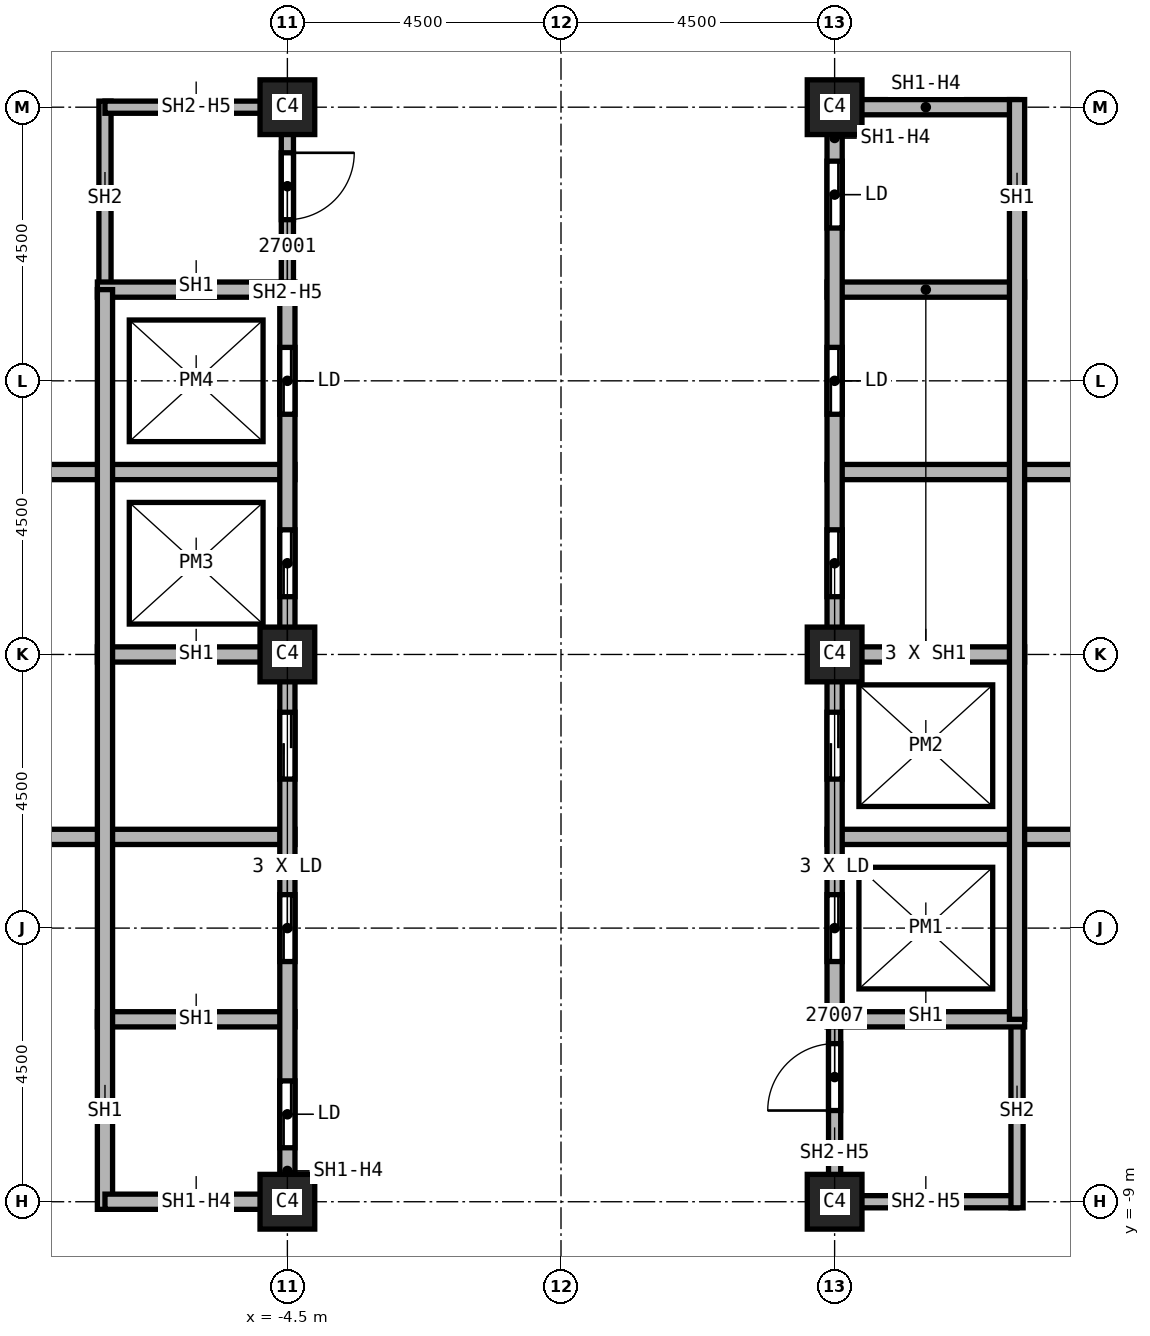
"""IFC4 building model, lengths in metres.
Left out: names, types, materials, properties, quantities, classifications, styles, units other than length and angle.
Written with IfcOpenShell. Run it as: python <this file> out.ifc"""

import sys

from ifc_helpers import new_model, si_unit, direction, frame, frame_2d, origin, origin_2d, place, context, subcontext, project, spatial, rectangle, extrude, element, fill, save


model = new_model("IFC4")
c1 = context("Model", 3, precision=1e-05, world=origin(), true_north=direction((0.0, 1.0)))
c2 = subcontext(c1, "Body", "Model", "MODEL_VIEW")
j1 = project(units=[si_unit("LENGTHUNIT", "METRE"), si_unit("PLANEANGLEUNIT", "RADIAN")], contexts=[c1])
p1 = place(None, origin())
s1 = spatial("IfcSite", under=j1, at=p1, CompositionType="ELEMENT")
p2 = place(p1, origin())
s2 = spatial("IfcBuilding", under=s1, at=p2, CompositionType="ELEMENT")
p3 = place(p2, frame((0.0, 0.0, 178.0)))
s3 = spatial("IfcBuildingStorey", under=s2, at=p3, CompositionType="ELEMENT", Elevation=178.0)
for number, where, z_axis, x_axis in (
    (1, (4.5, 0.0, 0.0), (0.0, 0.0, 1.0), (1.0, 0.0, 0.0)),
    (2, (4.5, 9.0, 0.0), (0.0, 0.0, 1.0), (1.0, 0.0, 0.0)),
    (3, (4.5, -9.0, 0.0), (0.0, 0.0, 1.0), (1.0, 0.0, 0.0)),
    (4, (-4.5, 0.0, 0.0), (0.0, 0.0, 1.0), (1.0, 0.0, 0.0)),
    (5, (-4.5, 9.0, 0.0), (0.0, 0.0, 1.0), (1.0, 0.0, 0.0)),
    (6, (-4.5, -9.0, 0.0), (0.0, 0.0, 1.0), (1.0, 0.0, 0.0)),
):
    element("IfcColumn", number, at=place(p3, frame(where, z_axis=z_axis, x_axis=x_axis)), inside=s3, PredefinedType="COLUMN", context=c2, shape_type="SweptSolid", body=[
        extrude(rectangle(XDim=0.9, YDim=0.9, at=origin_2d()), origin(), (0.0, 0.0, 1.0), 5.72),
    ])
p4 = place(p3, frame((-7.5, 6.0, 0.0), z_axis=(0.0, 0.0, 1.0), x_axis=(0.0, 1.0, 0.0)))
e7 = element("IfcWall", 7, at=p4, inside=s3, PredefinedType="SOLIDWALL", context=c2, shape_type="SweptSolid", body=[
    extrude(rectangle(XDim=3.1, YDim=0.2, at=frame_2d((1.55, 0.0))), origin(), (0.0, 0.0, 1.0), 5.72),
])
p5 = place(p3, frame((-7.5, 9.0, 0.0), z_axis=(0.0, 0.0, 1.0), x_axis=(1.0, 0.0, 0.0)))
e8 = element("IfcWall", 8, at=p5, inside=s3, PredefinedType="SOLIDWALL", context=c2, shape_type="SweptSolid", body=[
    extrude(rectangle(XDim=3.0, YDim=0.2, at=frame_2d((1.5, 0.0))), origin(), (0.0, 0.0, 1.0), 4.958),
])
p6 = place(p3, frame((-4.5, 9.1, 0.0), z_axis=(0.0, 0.0, 1.0), x_axis=(0.0, -1.0, 0.0)))
e9 = element("IfcWall", 9, at=p6, inside=s3, PredefinedType="SOLIDWALL", context=c2, shape_type="SweptSolid", body=[
    extrude(rectangle(XDim=3.1, YDim=0.2, at=frame_2d((1.55, 0.0))), origin(), (0.0, 0.0, 1.0), 4.958),
])
p7 = place(p6, frame((0.85, 0.0, 0.0)))
e10 = element("IfcOpeningElement", 10, at=p7, cuts=e9, PredefinedType="OPENING", context=c2, shape_type="SweptSolid", body=[
    extrude(rectangle(XDim=1.1, YDim=2.1, at=frame_2d((0.55, 1.05))), frame((0.0, 0.1, 0.0), z_axis=(0.0, -1.0, 0.0), x_axis=(1.0, 0.0, 0.0)), (0.0, 0.0, 1.0), 0.2),
])
p8 = place(p3, frame((4.5, -9.1, 0.0), z_axis=(0.0, 0.0, 1.0), x_axis=(0.0, 1.0, 0.0)))
e11 = element("IfcWall", 11, at=p8, inside=s3, PredefinedType="SOLIDWALL", context=c2, shape_type="SweptSolid", body=[
    extrude(rectangle(XDim=3.1, YDim=0.2, at=frame_2d((1.55, 0.0))), origin(), (0.0, 0.0, 1.0), 4.958),
])
p9 = place(p8, frame((1.6, 0.0, 0.0)))
e12 = element("IfcOpeningElement", 12, at=p9, cuts=e11, PredefinedType="OPENING", context=c2, shape_type="SweptSolid", body=[
    extrude(rectangle(XDim=1.1, YDim=2.1, at=frame_2d((0.55, 1.05))), frame((0.0, 0.1, 0.0), z_axis=(0.0, -1.0, 0.0), x_axis=(1.0, 0.0, 0.0)), (0.0, 0.0, 1.0), 0.2),
])
p10 = place(p3, frame((7.5, -9.0, 0.0), z_axis=(0.0, 0.0, 1.0), x_axis=(-1.0, 0.0, 0.0)))
e13 = element("IfcWall", 13, at=p10, inside=s3, PredefinedType="SOLIDWALL", context=c2, shape_type="SweptSolid", body=[
    extrude(rectangle(XDim=3.0, YDim=0.2, at=frame_2d((1.5, 0.0))), origin(), (0.0, 0.0, 1.0), 4.958),
])
p11 = place(p3, frame((7.5, -6.0, 0.0), z_axis=(0.0, 0.0, 1.0), x_axis=(0.0, -1.0, 0.0)))
e14 = element("IfcWall", 14, at=p11, inside=s3, PredefinedType="SOLIDWALL", context=c2, shape_type="SweptSolid", body=[
    extrude(rectangle(XDim=3.1, YDim=0.2, at=frame_2d((1.55, 0.0))), origin(), (0.0, 0.0, 1.0), 5.72),
])
p12 = place(p3, frame((-13.625, 3.0, 0.0), z_axis=(0.0, 0.0, 1.0), x_axis=(1.0, 0.0, 0.0)))
e15 = element("IfcWall", 15, at=p12, inside=s3, PredefinedType="SOLIDWALL", context=c2, shape_type="SweptSolid", body=[
    extrude(rectangle(XDim=9.25, YDim=0.25, at=frame_2d((4.625, 0.0))), origin(), (0.0, 0.0, 1.0), 5.72),
])
p13 = place(p12, frame((3.25, 0.0, 0.0)))
e16 = element("IfcOpeningElement", 16, at=p13, cuts=e15, PredefinedType="OPENING", context=c2, shape_type="SweptSolid", body=[
    extrude(rectangle(XDim=1.1, YDim=2.1, at=frame_2d((0.55, 1.05))), frame((0.0, 0.125, 0.0), z_axis=(0.0, -1.0, 0.0), x_axis=(1.0, 0.0, 0.0)), (0.0, 0.0, 1.0), 0.25),
])
p14 = place(p3, frame((-13.625, -3.0, 0.0), z_axis=(0.0, 0.0, 1.0), x_axis=(1.0, 0.0, 0.0)))
e17 = element("IfcWall", 17, at=p14, inside=s3, PredefinedType="SOLIDWALL", context=c2, shape_type="SweptSolid", body=[
    extrude(rectangle(XDim=9.25, YDim=0.25, at=frame_2d((4.625, 0.0))), origin(), (0.0, 0.0, 1.0), 5.72),
])
p15 = place(p14, frame((3.25, 0.0, 0.0)))
e18 = element("IfcOpeningElement", 18, at=p15, cuts=e17, PredefinedType="OPENING", context=c2, shape_type="SweptSolid", body=[
    extrude(rectangle(XDim=1.1, YDim=2.1, at=frame_2d((0.55, 1.05))), frame((0.0, 0.125, 0.0), z_axis=(0.0, -1.0, 0.0), x_axis=(1.0, 0.0, 0.0)), (0.0, 0.0, 1.0), 0.25),
])
for number, where, z_axis, x_axis in (
    (19, (-7.625, -6.0, 0.0), (0.0, 0.0, 1.0), (1.0, 0.0, 0.0)),
    (20, (-7.625, 0.0, 0.0), (0.0, 0.0, 1.0), (1.0, 0.0, 0.0)),
    (21, (-7.625, 6.0, 0.0), (0.0, 0.0, 1.0), (1.0, 0.0, 0.0)),
):
    element("IfcWall", number, at=place(p3, frame(where, z_axis=z_axis, x_axis=x_axis)), inside=s3, PredefinedType="SOLIDWALL", context=c2, shape_type="SweptSolid", body=[
        extrude(rectangle(XDim=3.25, YDim=0.25, at=frame_2d((1.625, 0.0))), origin(), (0.0, 0.0, 1.0), 5.72),
    ])
p16 = place(p3, frame((-7.5, -9.125, 0.0), z_axis=(0.0, 0.0, 1.0), x_axis=(0.0, 1.0, 0.0)))
e22 = element("IfcWall", 22, at=p16, inside=s3, PredefinedType="SOLIDWALL", context=c2, shape_type="SweptSolid", body=[
    extrude(rectangle(XDim=15.125, YDim=0.25, at=frame_2d((7.562, 0.0))), origin(), (0.0, 0.0, 1.0), 5.72),
])
p17 = place(p3, frame((-4.5, -9.0, 0.0), z_axis=(0.0, 0.0, 1.0), x_axis=(-1.0, 0.0, 0.0)))
e23 = element("IfcWall", 23, at=p17, inside=s3, PredefinedType="SOLIDWALL", context=c2, shape_type="SweptSolid", body=[
    extrude(rectangle(XDim=3.0, YDim=0.25, at=frame_2d((1.5, 0.0))), origin(), (0.0, 0.0, 1.0), 4.958),
])
p18 = place(p3, frame((-4.5, 6.0, 0.0), z_axis=(0.0, 0.0, 1.0), x_axis=(0.0, -1.0, 0.0)))
e24 = element("IfcWall", 24, at=p18, inside=s3, PredefinedType="SOLIDWALL", context=c2, shape_type="SweptSolid", body=[
    extrude(rectangle(XDim=15.125, YDim=0.25, at=frame_2d((7.562, 0.0))), origin(), (0.0, 0.0, 1.0), 4.958),
])
p19 = place(p18, frame((13.012, 0.0, 0.0)))
e25 = element("IfcOpeningElement", 25, at=p19, cuts=e24, PredefinedType="OPENING", context=c2, shape_type="SweptSolid", body=[
    extrude(rectangle(XDim=1.1, YDim=2.1, at=frame_2d((0.55, 1.05))), frame((0.0, 0.125, 0.0), z_axis=(0.0, -1.0, 0.0), x_axis=(1.0, 0.0, 0.0)), (0.0, 0.0, 1.0), 0.25),
])
p20 = place(p18, frame((9.95, 0.0, 0.0)))
e26 = element("IfcOpeningElement", 26, at=p20, cuts=e24, PredefinedType="OPENING", context=c2, shape_type="SweptSolid", body=[
    extrude(rectangle(XDim=1.1, YDim=2.1, at=frame_2d((0.55, 1.05))), frame((0.0, 0.125, 0.0), z_axis=(0.0, -1.0, 0.0), x_axis=(1.0, 0.0, 0.0)), (0.0, 0.0, 1.0), 0.25),
])
p21 = place(p18, frame((6.95, 0.0, 0.0)))
e27 = element("IfcOpeningElement", 27, at=p21, cuts=e24, PredefinedType="OPENING", context=c2, shape_type="SweptSolid", body=[
    extrude(rectangle(XDim=1.1, YDim=2.1, at=frame_2d((0.55, 1.05))), frame((0.0, 0.125, 0.0), z_axis=(0.0, -1.0, 0.0), x_axis=(1.0, 0.0, 0.0)), (0.0, 0.0, 1.0), 0.25),
])
p22 = place(p18, frame((3.95, 0.0, 0.0)))
e28 = element("IfcOpeningElement", 28, at=p22, cuts=e24, PredefinedType="OPENING", context=c2, shape_type="SweptSolid", body=[
    extrude(rectangle(XDim=1.1, YDim=2.1, at=frame_2d((0.55, 1.05))), frame((0.0, 0.125, 0.0), z_axis=(0.0, -1.0, 0.0), x_axis=(1.0, 0.0, 0.0)), (0.0, 0.0, 1.0), 0.25),
])
p23 = place(p18, frame((0.95, 0.0, 0.0)))
e29 = element("IfcOpeningElement", 29, at=p23, cuts=e24, PredefinedType="OPENING", context=c2, shape_type="SweptSolid", body=[
    extrude(rectangle(XDim=1.1, YDim=2.1, at=frame_2d((0.55, 1.05))), frame((0.0, 0.125, 0.0), z_axis=(0.0, -1.0, 0.0), x_axis=(1.0, 0.0, 0.0)), (0.0, 0.0, 1.0), 0.25),
])
p24 = place(p3, frame((4.375, -6.0, 0.0), z_axis=(0.0, 0.0, 1.0), x_axis=(1.0, 0.0, 0.0)))
e30 = element("IfcWall", 30, at=p24, inside=s3, PredefinedType="SOLIDWALL", context=c2, shape_type="SweptSolid", body=[
    extrude(rectangle(XDim=3.25, YDim=0.25, at=frame_2d((1.625, 0.0))), origin(), (0.0, 0.0, 1.0), 5.72),
])
p25 = place(p3, frame((4.375, -3.0, 0.0), z_axis=(0.0, 0.0, 1.0), x_axis=(1.0, 0.0, 0.0)))
e31 = element("IfcWall", 31, at=p25, inside=s3, PredefinedType="SOLIDWALL", context=c2, shape_type="SweptSolid", body=[
    extrude(rectangle(XDim=9.25, YDim=0.25, at=frame_2d((4.625, 0.0))), origin(), (0.0, 0.0, 1.0), 5.72),
])
p26 = place(p25, frame((4.875, 0.0, 0.0)))
e32 = element("IfcOpeningElement", 32, at=p26, cuts=e31, PredefinedType="OPENING", context=c2, shape_type="SweptSolid", body=[
    extrude(rectangle(XDim=1.1, YDim=2.1, at=frame_2d((0.55, 1.05))), frame((0.0, 0.125, 0.0), z_axis=(0.0, -1.0, 0.0), x_axis=(1.0, 0.0, 0.0)), (0.0, 0.0, 1.0), 0.25),
])
p27 = place(p3, frame((4.375, 0.0, 0.0), z_axis=(0.0, 0.0, 1.0), x_axis=(1.0, 0.0, 0.0)))
e33 = element("IfcWall", 33, at=p27, inside=s3, PredefinedType="SOLIDWALL", context=c2, shape_type="SweptSolid", body=[
    extrude(rectangle(XDim=3.25, YDim=0.25, at=frame_2d((1.625, 0.0))), origin(), (0.0, 0.0, 1.0), 5.72),
])
p28 = place(p3, frame((4.375, 3.0, 0.0), z_axis=(0.0, 0.0, 1.0), x_axis=(1.0, 0.0, 0.0)))
e34 = element("IfcWall", 34, at=p28, inside=s3, PredefinedType="SOLIDWALL", context=c2, shape_type="SweptSolid", body=[
    extrude(rectangle(XDim=9.25, YDim=0.25, at=frame_2d((4.625, 0.0))), origin(), (0.0, 0.0, 1.0), 5.72),
])
p29 = place(p28, frame((4.875, 0.0, 0.0)))
e35 = element("IfcOpeningElement", 35, at=p29, cuts=e34, PredefinedType="OPENING", context=c2, shape_type="SweptSolid", body=[
    extrude(rectangle(XDim=1.1, YDim=2.1, at=frame_2d((0.55, 1.05))), frame((0.0, 0.125, 0.0), z_axis=(0.0, -1.0, 0.0), x_axis=(1.0, 0.0, 0.0)), (0.0, 0.0, 1.0), 0.25),
])
p30 = place(p3, frame((4.375, 6.0, 0.0), z_axis=(0.0, 0.0, 1.0), x_axis=(1.0, 0.0, 0.0)))
e36 = element("IfcWall", 36, at=p30, inside=s3, PredefinedType="SOLIDWALL", context=c2, shape_type="SweptSolid", body=[
    extrude(rectangle(XDim=3.25, YDim=0.25, at=frame_2d((1.625, 0.0))), origin(), (0.0, 0.0, 1.0), 5.72),
])
p31 = place(p3, frame((4.5, -6.0, 0.0), z_axis=(0.0, 0.0, 1.0), x_axis=(0.0, 1.0, 0.0)))
e37 = element("IfcWall", 37, at=p31, inside=s3, PredefinedType="SOLIDWALL", context=c2, shape_type="SweptSolid", body=[
    extrude(rectangle(XDim=15.125, YDim=0.25, at=frame_2d((7.562, 0.0))), origin(), (0.0, 0.0, 1.0), 4.958),
])
p32 = place(p31, frame((0.95, 0.0, 0.0)))
e38 = element("IfcOpeningElement", 38, at=p32, cuts=e37, PredefinedType="OPENING", context=c2, shape_type="SweptSolid", body=[
    extrude(rectangle(XDim=1.1, YDim=2.1, at=frame_2d((0.55, 1.05))), frame((0.0, 0.125, 0.0), z_axis=(0.0, -1.0, 0.0), x_axis=(1.0, 0.0, 0.0)), (0.0, 0.0, 1.0), 0.25),
])
p33 = place(p31, frame((3.95, 0.0, 0.0)))
e39 = element("IfcOpeningElement", 39, at=p33, cuts=e37, PredefinedType="OPENING", context=c2, shape_type="SweptSolid", body=[
    extrude(rectangle(XDim=1.1, YDim=2.1, at=frame_2d((0.55, 1.05))), frame((0.0, 0.125, 0.0), z_axis=(0.0, -1.0, 0.0), x_axis=(1.0, 0.0, 0.0)), (0.0, 0.0, 1.0), 0.25),
])
p34 = place(p31, frame((6.95, 0.0, 0.0)))
e40 = element("IfcOpeningElement", 40, at=p34, cuts=e37, PredefinedType="OPENING", context=c2, shape_type="SweptSolid", body=[
    extrude(rectangle(XDim=1.1, YDim=2.1, at=frame_2d((0.55, 1.05))), frame((0.0, 0.125, 0.0), z_axis=(0.0, -1.0, 0.0), x_axis=(1.0, 0.0, 0.0)), (0.0, 0.0, 1.0), 0.25),
])
p35 = place(p31, frame((9.95, 0.0, 0.0)))
e41 = element("IfcOpeningElement", 41, at=p35, cuts=e37, PredefinedType="OPENING", context=c2, shape_type="SweptSolid", body=[
    extrude(rectangle(XDim=1.1, YDim=2.1, at=frame_2d((0.55, 1.05))), frame((0.0, 0.125, 0.0), z_axis=(0.0, -1.0, 0.0), x_axis=(1.0, 0.0, 0.0)), (0.0, 0.0, 1.0), 0.25),
])
p36 = place(p31, frame((13.012, 0.0, 0.0)))
e42 = element("IfcOpeningElement", 42, at=p36, cuts=e37, PredefinedType="OPENING", context=c2, shape_type="SweptSolid", body=[
    extrude(rectangle(XDim=1.1, YDim=2.1, at=frame_2d((0.55, 1.05))), frame((0.0, 0.125, 0.0), z_axis=(0.0, -1.0, 0.0), x_axis=(1.0, 0.0, 0.0)), (0.0, 0.0, 1.0), 0.25),
])
p37 = place(p3, frame((4.5, 9.0, 0.0), z_axis=(0.0, 0.0, 1.0), x_axis=(1.0, 0.0, 0.0)))
e43 = element("IfcWall", 43, at=p37, inside=s3, PredefinedType="SOLIDWALL", context=c2, shape_type="SweptSolid", body=[
    extrude(rectangle(XDim=3.0, YDim=0.25, at=frame_2d((1.5, 0.0))), origin(), (0.0, 0.0, 1.0), 4.958),
])
p38 = place(p3, frame((7.5, 9.125, 0.0), z_axis=(0.0, 0.0, 1.0), x_axis=(0.0, -1.0, 0.0)))
e44 = element("IfcWall", 44, at=p38, inside=s3, PredefinedType="SOLIDWALL", context=c2, shape_type="SweptSolid", body=[
    extrude(rectangle(XDim=15.125, YDim=0.25, at=frame_2d((7.562, 0.0))), origin(), (0.0, 0.0, 1.0), 5.72),
])
p39 = place(p7, origin())
e45 = element("IfcDoor", 45, at=p39, inside=s3, OperationType="SINGLE_SWING_RIGHT", PredefinedType="DOOR", context=c2, shape_type="SweptSolid", body=[
    extrude(rectangle(XDim=1.1, YDim=2.1, at=frame_2d((0.55, 1.05))), frame((0.0, 0.025, 0.0), z_axis=(0.0, -1.0, 0.0), x_axis=(1.0, 0.0, 0.0)), (0.0, 0.0, 1.0), 0.05),
])
fill(e10, e45)
p40 = place(p9, origin())
e46 = element("IfcDoor", 46, at=p40, inside=s3, OperationType="SINGLE_SWING_RIGHT", PredefinedType="DOOR", context=c2, shape_type="SweptSolid", body=[
    extrude(rectangle(XDim=1.1, YDim=2.1, at=frame_2d((0.55, 1.05))), frame((0.0, 0.025, 0.0), z_axis=(0.0, -1.0, 0.0), x_axis=(1.0, 0.0, 0.0)), (0.0, 0.0, 1.0), 0.05),
])
fill(e12, e46)
p41 = place(p19, origin())
e47 = element("IfcDoor", 47, at=p41, inside=s3, OperationType="SLIDING_TO_LEFT", PredefinedType="DOOR", context=c2, shape_type="SweptSolid", body=[
    extrude(rectangle(XDim=1.1, YDim=2.1, at=frame_2d((0.55, 1.05))), frame((0.0, 0.025, 0.0), z_axis=(0.0, -1.0, 0.0), x_axis=(1.0, 0.0, 0.0)), (0.0, 0.0, 1.0), 0.05),
])
fill(e25, e47)
p42 = place(p20, origin())
e48 = element("IfcDoor", 48, at=p42, inside=s3, OperationType="SLIDING_TO_LEFT", PredefinedType="DOOR", context=c2, shape_type="SweptSolid", body=[
    extrude(rectangle(XDim=1.1, YDim=2.1, at=frame_2d((0.55, 1.05))), frame((0.0, 0.025, 0.0), z_axis=(0.0, -1.0, 0.0), x_axis=(1.0, 0.0, 0.0)), (0.0, 0.0, 1.0), 0.05),
])
fill(e26, e48)
p43 = place(p21, origin())
e49 = element("IfcDoor", 49, at=p43, inside=s3, OperationType="SLIDING_TO_LEFT", PredefinedType="DOOR", context=c2, shape_type="SweptSolid", body=[
    extrude(rectangle(XDim=1.1, YDim=2.1, at=frame_2d((0.55, 1.05))), frame((0.0, 0.025, 0.0), z_axis=(0.0, -1.0, 0.0), x_axis=(1.0, 0.0, 0.0)), (0.0, 0.0, 1.0), 0.05),
])
fill(e27, e49)
p44 = place(p22, origin())
e50 = element("IfcDoor", 50, at=p44, inside=s3, OperationType="SLIDING_TO_LEFT", PredefinedType="DOOR", context=c2, shape_type="SweptSolid", body=[
    extrude(rectangle(XDim=1.1, YDim=2.1, at=frame_2d((0.55, 1.05))), frame((0.0, 0.025, 0.0), z_axis=(0.0, -1.0, 0.0), x_axis=(1.0, 0.0, 0.0)), (0.0, 0.0, 1.0), 0.05),
])
fill(e28, e50)
p45 = place(p23, origin())
e51 = element("IfcDoor", 51, at=p45, inside=s3, OperationType="SLIDING_TO_LEFT", PredefinedType="DOOR", context=c2, shape_type="SweptSolid", body=[
    extrude(rectangle(XDim=1.1, YDim=2.1, at=frame_2d((0.55, 1.05))), frame((0.0, 0.025, 0.0), z_axis=(0.0, -1.0, 0.0), x_axis=(1.0, 0.0, 0.0)), (0.0, 0.0, 1.0), 0.05),
])
fill(e29, e51)
p46 = place(p32, origin())
e52 = element("IfcDoor", 52, at=p46, inside=s3, OperationType="SLIDING_TO_LEFT", PredefinedType="DOOR", context=c2, shape_type="SweptSolid", body=[
    extrude(rectangle(XDim=1.1, YDim=2.1, at=frame_2d((0.55, 1.05))), frame((0.0, 0.025, 0.0), z_axis=(0.0, -1.0, 0.0), x_axis=(1.0, 0.0, 0.0)), (0.0, 0.0, 1.0), 0.05),
])
fill(e38, e52)
p47 = place(p33, origin())
e53 = element("IfcDoor", 53, at=p47, inside=s3, OperationType="SLIDING_TO_LEFT", PredefinedType="DOOR", context=c2, shape_type="SweptSolid", body=[
    extrude(rectangle(XDim=1.1, YDim=2.1, at=frame_2d((0.55, 1.05))), frame((0.0, 0.025, 0.0), z_axis=(0.0, -1.0, 0.0), x_axis=(1.0, 0.0, 0.0)), (0.0, 0.0, 1.0), 0.05),
])
fill(e39, e53)
p48 = place(p34, origin())
e54 = element("IfcDoor", 54, at=p48, inside=s3, OperationType="SLIDING_TO_LEFT", PredefinedType="DOOR", context=c2, shape_type="SweptSolid", body=[
    extrude(rectangle(XDim=1.1, YDim=2.1, at=frame_2d((0.55, 1.05))), frame((0.0, 0.025, 0.0), z_axis=(0.0, -1.0, 0.0), x_axis=(1.0, 0.0, 0.0)), (0.0, 0.0, 1.0), 0.05),
])
fill(e40, e54)
p49 = place(p35, origin())
e55 = element("IfcDoor", 55, at=p49, inside=s3, OperationType="SLIDING_TO_LEFT", PredefinedType="DOOR", context=c2, shape_type="SweptSolid", body=[
    extrude(rectangle(XDim=1.1, YDim=2.1, at=frame_2d((0.55, 1.05))), frame((0.0, 0.025, 0.0), z_axis=(0.0, -1.0, 0.0), x_axis=(1.0, 0.0, 0.0)), (0.0, 0.0, 1.0), 0.05),
])
fill(e41, e55)
p50 = place(p36, origin())
e56 = element("IfcDoor", 56, at=p50, inside=s3, OperationType="SLIDING_TO_LEFT", PredefinedType="DOOR", context=c2, shape_type="SweptSolid", body=[
    extrude(rectangle(XDim=1.1, YDim=2.1, at=frame_2d((0.55, 1.05))), frame((0.0, 0.025, 0.0), z_axis=(0.0, -1.0, 0.0), x_axis=(1.0, 0.0, 0.0)), (0.0, 0.0, 1.0), 0.05),
])
fill(e42, e56)
save(model, sys.argv[1])
